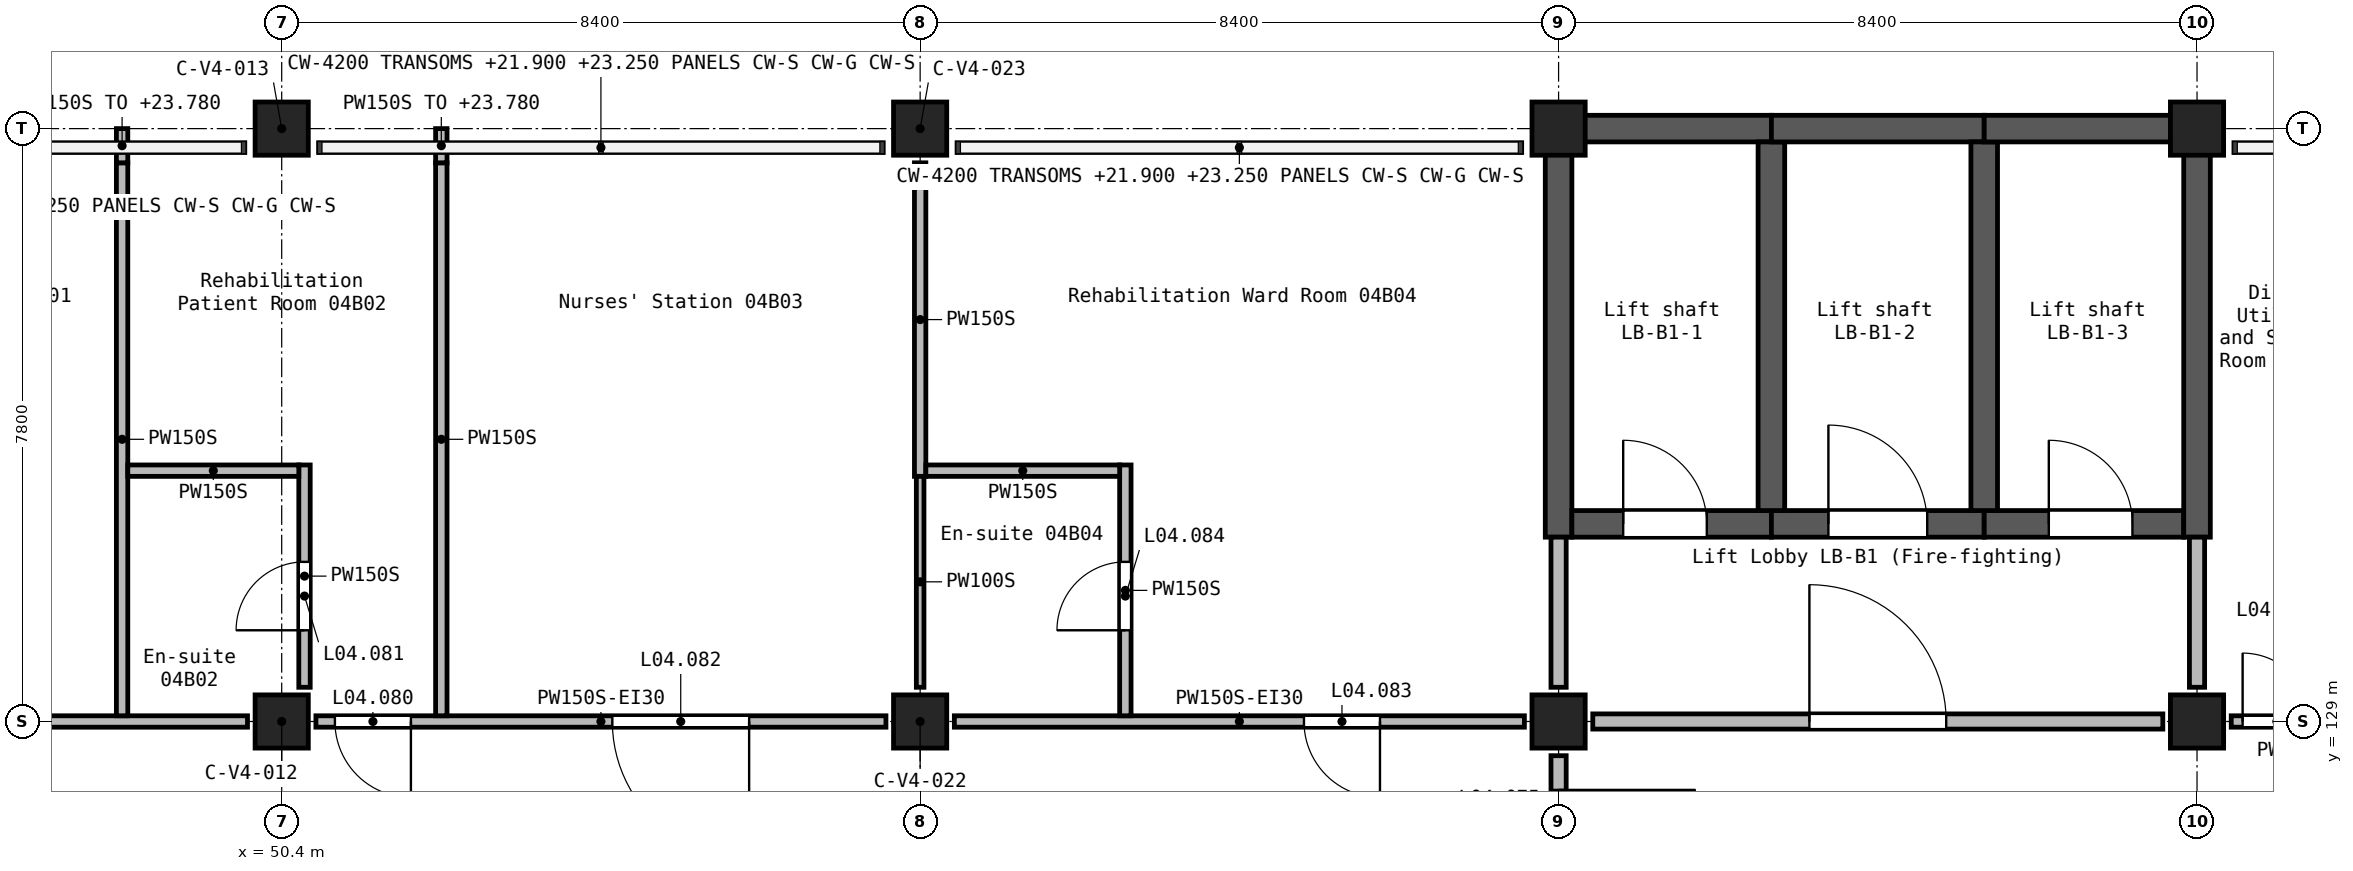
"""IFC4 building model, lengths in metres.
Left out: names, types, materials, properties, quantities, classifications, styles, units other than length and angle.
Written with IfcOpenShell. Run it as: python <this file> out.ifc"""

import sys

from ifc_helpers import new_model, si_unit, direction, frame, frame_2d, origin, origin_2d, place, context, subcontext, project, spatial, rectangle, extrude, element, fill, save


model = new_model("IFC4")
c1 = context("Model", 3, precision=1e-05, world=origin(), true_north=direction((0.0, 1.0)))
c2 = subcontext(c1, "Body", "Model", "MODEL_VIEW")
j1 = project(units=[si_unit("LENGTHUNIT", "METRE"), si_unit("PLANEANGLEUNIT", "RADIAN")], contexts=[c1])
p1 = place(None, origin())
s1 = spatial("IfcSite", under=j1, at=p1, CompositionType="ELEMENT")
p2 = place(p1, origin())
s2 = spatial("IfcBuilding", under=s1, at=p2, CompositionType="ELEMENT")
p3 = place(p2, frame((0.0, 0.0, 21.0)))
s3 = spatial("IfcBuildingStorey", under=s2, at=p3, CompositionType="ELEMENT", Elevation=21.0)
for number, where, z_axis, x_axis in (
    (1, (50.4, 129.0, 0.0), (0.0, 0.0, 1.0), (1.0, 0.0, 0.0)),
    (2, (50.4, 136.8, 0.0), (0.0, 0.0, 1.0), (1.0, 0.0, 0.0)),
    (3, (58.8, 129.0, 0.0), (0.0, 0.0, 1.0), (1.0, 0.0, 0.0)),
    (4, (58.8, 136.8, 0.0), (0.0, 0.0, 1.0), (1.0, 0.0, 0.0)),
    (5, (67.2, 129.0, 0.0), (0.0, 0.0, 1.0), (1.0, 0.0, 0.0)),
    (6, (67.2, 136.8, 0.0), (0.0, 0.0, 1.0), (1.0, 0.0, 0.0)),
    (7, (75.6, 129.0, 0.0), (0.0, 0.0, 1.0), (1.0, 0.0, 0.0)),
    (8, (75.6, 136.8, 0.0), (0.0, 0.0, 1.0), (1.0, 0.0, 0.0)),
):
    element("IfcColumn", number, at=place(p3, frame(where, z_axis=z_axis, x_axis=x_axis)), inside=s3, PredefinedType="COLUMN", context=c2, shape_type="SweptSolid", body=[
        extrude(rectangle(XDim=0.7, YDim=0.7, at=origin_2d()), origin(), (0.0, 0.0, 1.0), 3.9),
    ])
p4 = place(p3, frame((67.025, 136.8, 0.0), z_axis=(0.0, 0.0, 1.0), x_axis=(1.0, 0.0, 0.0)))
e9 = element("IfcWall", 9, at=p4, inside=s3, PredefinedType="SHEAR", context=c2, shape_type="SweptSolid", body=[
    extrude(rectangle(XDim=2.975, YDim=0.35, at=frame_2d((1.488, 0.0))), origin(), (0.0, 0.0, 1.0), 3.9),
])
p5 = place(p3, frame((67.2, 131.425, 0.0), z_axis=(0.0, 0.0, 1.0), x_axis=(0.0, 1.0, 0.0)))
e10 = element("IfcWall", 10, at=p5, inside=s3, PredefinedType="SHEAR", context=c2, shape_type="SweptSolid", body=[
    extrude(rectangle(XDim=5.2, YDim=0.35, at=frame_2d((2.6, 0.0))), origin(), (0.0, 0.0, 1.0), 3.9),
])
p6 = place(p3, frame((67.375, 131.6, 0.0), z_axis=(0.0, 0.0, 1.0), x_axis=(1.0, 0.0, 0.0)))
e11 = element("IfcWall", 11, at=p6, inside=s3, PredefinedType="SHEAR", context=c2, shape_type="SweptSolid", body=[
    extrude(rectangle(XDim=2.625, YDim=0.35, at=frame_2d((1.312, 0.0))), origin(), (0.0, 0.0, 1.0), 3.9),
])
p7 = place(p6, frame((0.675, 0.0, 0.0)))
e12 = element("IfcOpeningElement", 12, at=p7, cuts=e11, PredefinedType="OPENING", context=c2, shape_type="SweptSolid", body=[
    extrude(rectangle(XDim=1.1, YDim=2.1, at=frame_2d((0.55, 1.05))), frame((0.0, 0.185, 0.0), z_axis=(0.0, -1.0, 0.0), x_axis=(1.0, 0.0, 0.0)), (0.0, 0.0, 1.0), 0.37),
])
p8 = place(p3, frame((70.0, 131.6, 0.0), z_axis=(0.0, 0.0, 1.0), x_axis=(1.0, 0.0, 0.0)))
e13 = element("IfcWall", 13, at=p8, inside=s3, PredefinedType="SHEAR", context=c2, shape_type="SweptSolid", body=[
    extrude(rectangle(XDim=2.8, YDim=0.35, at=frame_2d((1.4, 0.0))), origin(), (0.0, 0.0, 1.0), 3.9),
])
p9 = place(p8, frame((0.75, 0.0, 0.0)))
e14 = element("IfcOpeningElement", 14, at=p9, cuts=e13, PredefinedType="OPENING", context=c2, shape_type="SweptSolid", body=[
    extrude(rectangle(XDim=1.3, YDim=2.1, at=frame_2d((0.65, 1.05))), frame((0.0, 0.185, 0.0), z_axis=(0.0, -1.0, 0.0), x_axis=(1.0, 0.0, 0.0)), (0.0, 0.0, 1.0), 0.37),
])
p10 = place(p3, frame((70.0, 131.775, 0.0), z_axis=(0.0, 0.0, 1.0), x_axis=(0.0, 1.0, 0.0)))
e15 = element("IfcWall", 15, at=p10, inside=s3, PredefinedType="SHEAR", context=c2, shape_type="SweptSolid", body=[
    extrude(rectangle(XDim=4.85, YDim=0.35, at=frame_2d((2.425, 0.0))), origin(), (0.0, 0.0, 1.0), 3.9),
])
p11 = place(p3, frame((70.0, 136.8, 0.0), z_axis=(0.0, 0.0, 1.0), x_axis=(1.0, 0.0, 0.0)))
e16 = element("IfcWall", 16, at=p11, inside=s3, PredefinedType="SHEAR", context=c2, shape_type="SweptSolid", body=[
    extrude(rectangle(XDim=2.8, YDim=0.35, at=frame_2d((1.4, 0.0))), origin(), (0.0, 0.0, 1.0), 3.9),
])
p12 = place(p3, frame((72.8, 131.6, 0.0), z_axis=(0.0, 0.0, 1.0), x_axis=(1.0, 0.0, 0.0)))
e17 = element("IfcWall", 17, at=p12, inside=s3, PredefinedType="SHEAR", context=c2, shape_type="SweptSolid", body=[
    extrude(rectangle(XDim=2.625, YDim=0.35, at=frame_2d((1.312, 0.0))), origin(), (0.0, 0.0, 1.0), 3.9),
])
p13 = place(p12, frame((0.85, 0.0, 0.0)))
e18 = element("IfcOpeningElement", 18, at=p13, cuts=e17, PredefinedType="OPENING", context=c2, shape_type="SweptSolid", body=[
    extrude(rectangle(XDim=1.1, YDim=2.1, at=frame_2d((0.55, 1.05))), frame((0.0, 0.185, 0.0), z_axis=(0.0, -1.0, 0.0), x_axis=(1.0, 0.0, 0.0)), (0.0, 0.0, 1.0), 0.37),
])
p14 = place(p3, frame((72.8, 131.775, 0.0), z_axis=(0.0, 0.0, 1.0), x_axis=(0.0, 1.0, 0.0)))
e19 = element("IfcWall", 19, at=p14, inside=s3, PredefinedType="SHEAR", context=c2, shape_type="SweptSolid", body=[
    extrude(rectangle(XDim=4.85, YDim=0.35, at=frame_2d((2.425, 0.0))), origin(), (0.0, 0.0, 1.0), 3.9),
])
p15 = place(p3, frame((72.8, 136.8, 0.0), z_axis=(0.0, 0.0, 1.0), x_axis=(1.0, 0.0, 0.0)))
e20 = element("IfcWall", 20, at=p15, inside=s3, PredefinedType="SHEAR", context=c2, shape_type="SweptSolid", body=[
    extrude(rectangle(XDim=2.625, YDim=0.35, at=frame_2d((1.312, 0.0))), origin(), (0.0, 0.0, 1.0), 3.9),
])
p16 = place(p3, frame((75.6, 131.425, 0.0), z_axis=(0.0, 0.0, 1.0), x_axis=(0.0, 1.0, 0.0)))
e21 = element("IfcWall", 21, at=p16, inside=s3, PredefinedType="SHEAR", context=c2, shape_type="SweptSolid", body=[
    extrude(rectangle(XDim=5.55, YDim=0.35, at=frame_2d((2.775, 0.0))), origin(), (0.0, 0.0, 1.0), 3.9),
])
p17 = place(p3, frame((67.2, 131.425, 0.0), z_axis=(0.0, 0.0, 1.0), x_axis=(0.0, -1.0, 0.0)))
e22 = element("IfcWall", 22, at=p17, inside=s3, PredefinedType="SOLIDWALL", context=c2, shape_type="SweptSolid", body=[
    extrude(rectangle(XDim=1.975, YDim=0.2, at=frame_2d((0.988, 0.0))), origin(), (0.0, 0.0, 1.0), 3.6),
])
p18 = place(p3, frame((67.2, 128.55, 0.0), z_axis=(0.0, 0.0, 1.0), x_axis=(0.0, -1.0, 0.0)))
e23 = element("IfcWall", 23, at=p18, inside=s3, PredefinedType="SOLIDWALL", context=c2, shape_type="SweptSolid", body=[
    extrude(rectangle(XDim=2.7, YDim=0.2, at=frame_2d((1.35, 0.0))), origin(), (0.0, 0.0, 1.0), 3.6),
])
p19 = place(p18, frame((0.45, 0.0, 0.0)))
e24 = element("IfcOpeningElement", 24, at=p19, cuts=e23, PredefinedType="OPENING", context=c2, shape_type="SweptSolid", body=[
    extrude(rectangle(XDim=1.8, YDim=2.1, at=frame_2d((0.9, 1.05))), frame((0.0, 0.11, 0.0), z_axis=(0.0, -1.0, 0.0), x_axis=(1.0, 0.0, 0.0)), (0.0, 0.0, 1.0), 0.22),
])
p20 = place(p3, frame((67.65, 129.0, 0.0), z_axis=(0.0, 0.0, 1.0), x_axis=(1.0, 0.0, 0.0)))
e25 = element("IfcWall", 25, at=p20, inside=s3, PredefinedType="SOLIDWALL", context=c2, shape_type="SweptSolid", body=[
    extrude(rectangle(XDim=7.5, YDim=0.2, at=frame_2d((3.75, 0.0))), origin(), (0.0, 0.0, 1.0), 3.6),
])
p21 = place(p20, frame((2.85, 0.0, 0.0)))
e26 = element("IfcOpeningElement", 26, at=p21, cuts=e25, PredefinedType="OPENING", context=c2, shape_type="SweptSolid", body=[
    extrude(rectangle(XDim=1.8, YDim=2.1, at=frame_2d((0.9, 1.05))), frame((0.0, 0.11, 0.0), z_axis=(0.0, -1.0, 0.0), x_axis=(1.0, 0.0, 0.0)), (0.0, 0.0, 1.0), 0.22),
])
p22 = place(p3, frame((75.6, 129.45, 0.0), z_axis=(0.0, 0.0, 1.0), x_axis=(0.0, 1.0, 0.0)))
e27 = element("IfcWall", 27, at=p22, inside=s3, PredefinedType="SOLIDWALL", context=c2, shape_type="SweptSolid", body=[
    extrude(rectangle(XDim=1.975, YDim=0.2, at=frame_2d((0.988, 0.0))), origin(), (0.0, 0.0, 1.0), 3.6),
])
p23 = place(p3, frame((66.75, 129.0, 0.0), z_axis=(0.0, 0.0, 1.0), x_axis=(-1.0, 0.0, 0.0)))
e28 = element("IfcWall", 28, at=p23, inside=s3, PredefinedType="PARTITIONING", context=c2, shape_type="SweptSolid", body=[
    extrude(rectangle(XDim=7.5, YDim=0.15, at=frame_2d((3.75, 0.0))), origin(), (0.0, 0.0, 1.0), 3.6),
])
p24 = place(p23, frame((1.9, 0.0, 0.0)))
e29 = element("IfcOpeningElement", 29, at=p24, cuts=e28, PredefinedType="OPENING", context=c2, shape_type="SweptSolid", body=[
    extrude(rectangle(XDim=1.0, YDim=2.1, at=frame_2d((0.5, 1.05))), frame((0.0, 0.085, 0.0), z_axis=(0.0, -1.0, 0.0), x_axis=(1.0, 0.0, 0.0)), (0.0, 0.0, 1.0), 0.17),
])
p25 = place(p3, frame((58.35, 129.0, 0.0), z_axis=(0.0, 0.0, 1.0), x_axis=(-1.0, 0.0, 0.0)))
e30 = element("IfcWall", 30, at=p25, inside=s3, PredefinedType="PARTITIONING", context=c2, shape_type="SweptSolid", body=[
    extrude(rectangle(XDim=7.5, YDim=0.15, at=frame_2d((3.75, 0.0))), origin(), (0.0, 0.0, 1.0), 3.6),
])
p26 = place(p25, frame((6.25, 0.0, 0.0)))
e31 = element("IfcOpeningElement", 31, at=p26, cuts=e30, PredefinedType="OPENING", context=c2, shape_type="SweptSolid", body=[
    extrude(rectangle(XDim=1.0, YDim=2.1, at=frame_2d((0.5, 1.05))), frame((0.0, 0.085, 0.0), z_axis=(0.0, -1.0, 0.0), x_axis=(1.0, 0.0, 0.0)), (0.0, 0.0, 1.0), 0.17),
])
p27 = place(p25, frame((1.8, 0.0, 0.0)))
e32 = element("IfcOpeningElement", 32, at=p27, cuts=e30, PredefinedType="OPENING", context=c2, shape_type="SweptSolid", body=[
    extrude(rectangle(XDim=1.8, YDim=2.1, at=frame_2d((0.9, 1.05))), frame((0.0, 0.085, 0.0), z_axis=(0.0, -1.0, 0.0), x_axis=(1.0, 0.0, 0.0)), (0.0, 0.0, 1.0), 0.17),
])
p28 = place(p3, frame((49.95, 129.0, 0.0), z_axis=(0.0, 0.0, 1.0), x_axis=(-1.0, 0.0, 0.0)))
e33 = element("IfcWall", 33, at=p28, inside=s3, PredefinedType="PARTITIONING", context=c2, shape_type="SweptSolid", body=[
    extrude(rectangle(XDim=7.5, YDim=0.15, at=frame_2d((3.75, 0.0))), origin(), (0.0, 0.0, 1.0), 3.6),
])
p29 = place(p28, frame((2.95, 0.0, 0.0)))
e34 = element("IfcOpeningElement", 34, at=p29, cuts=e33, PredefinedType="OPENING", context=c2, shape_type="SweptSolid", body=[
    extrude(rectangle(XDim=1.0, YDim=2.1, at=frame_2d((0.5, 1.05))), frame((0.0, 0.085, 0.0), z_axis=(0.0, -1.0, 0.0), x_axis=(1.0, 0.0, 0.0)), (0.0, 0.0, 1.0), 0.17),
])
p30 = place(p3, frame((76.05, 129.0, 0.0), z_axis=(0.0, 0.0, 1.0), x_axis=(1.0, 0.0, 0.0)))
e35 = element("IfcWall", 35, at=p30, inside=s3, PredefinedType="PARTITIONING", context=c2, shape_type="SweptSolid", body=[
    extrude(rectangle(XDim=1.575, YDim=0.15, at=frame_2d((0.788, 0.0))), origin(), (0.0, 0.0, 1.0), 3.6),
])
p31 = place(p30, frame((0.15, 0.0, 0.0)))
e36 = element("IfcOpeningElement", 36, at=p31, cuts=e35, PredefinedType="OPENING", context=c2, shape_type="SweptSolid", body=[
    extrude(rectangle(XDim=0.9, YDim=2.1, at=frame_2d((0.45, 1.05))), frame((0.0, 0.085, 0.0), z_axis=(0.0, -1.0, 0.0), x_axis=(1.0, 0.0, 0.0)), (0.0, 0.0, 1.0), 0.17),
])
p32 = place(p3, frame((48.3, 129.075, 0.0), z_axis=(0.0, 0.0, 1.0), x_axis=(0.0, 1.0, 0.0)))
e37 = element("IfcWall", 37, at=p32, inside=s3, PredefinedType="PARTITIONING", context=c2, shape_type="SweptSolid", body=[
    extrude(rectangle(XDim=7.275, YDim=0.15, at=frame_2d((3.638, 0.0))), origin(), (0.0, 0.0, 1.0), 3.6),
])
p33 = place(p3, frame((48.3, 136.35, 0.0), z_axis=(0.0, 0.0, 1.0), x_axis=(0.0, 1.0, 0.0)))
e38 = element("IfcWall", 38, at=p33, inside=s3, PredefinedType="PARTITIONING", context=c2, shape_type="SweptSolid", body=[
    extrude(rectangle(XDim=0.45, YDim=0.15, at=frame_2d((0.225, 0.0))), origin(), (0.0, 0.0, 1.0), 2.78),
])
p34 = place(p3, frame((52.5, 129.075, 0.0), z_axis=(0.0, 0.0, 1.0), x_axis=(0.0, 1.0, 0.0)))
e39 = element("IfcWall", 39, at=p34, inside=s3, PredefinedType="PARTITIONING", context=c2, shape_type="SweptSolid", body=[
    extrude(rectangle(XDim=7.275, YDim=0.15, at=frame_2d((3.638, 0.0))), origin(), (0.0, 0.0, 1.0), 3.6),
])
p35 = place(p3, frame((52.5, 136.35, 0.0), z_axis=(0.0, 0.0, 1.0), x_axis=(0.0, 1.0, 0.0)))
e40 = element("IfcWall", 40, at=p35, inside=s3, PredefinedType="PARTITIONING", context=c2, shape_type="SweptSolid", body=[
    extrude(rectangle(XDim=0.45, YDim=0.15, at=frame_2d((0.225, 0.0))), origin(), (0.0, 0.0, 1.0), 2.78),
])
p36 = place(p3, frame((58.8, 132.225, 0.0), z_axis=(0.0, 0.0, 1.0), x_axis=(0.0, 1.0, 0.0)))
e41 = element("IfcWall", 41, at=p36, inside=s3, PredefinedType="PARTITIONING", context=c2, shape_type="SweptSolid", body=[
    extrude(rectangle(XDim=4.125, YDim=0.15, at=frame_2d((2.062, 0.0))), origin(), (0.0, 0.0, 1.0), 3.6),
])
p37 = place(p3, frame((50.7, 129.45, 0.0), z_axis=(0.0, 0.0, 1.0), x_axis=(0.0, 1.0, 0.0)))
e42 = element("IfcWall", 42, at=p37, inside=s3, PredefinedType="PARTITIONING", context=c2, shape_type="SweptSolid", body=[
    extrude(rectangle(XDim=2.925, YDim=0.15, at=frame_2d((1.462, 0.0))), origin(), (0.0, 0.0, 1.0), 3.6),
])
p38 = place(p37, frame((0.75, 0.0, 0.0)))
e43 = element("IfcOpeningElement", 43, at=p38, cuts=e42, PredefinedType="OPENING", context=c2, shape_type="SweptSolid", body=[
    extrude(rectangle(XDim=0.9, YDim=2.1, at=frame_2d((0.45, 1.05))), frame((0.0, 0.085, 0.0), z_axis=(0.0, -1.0, 0.0), x_axis=(1.0, 0.0, 0.0)), (0.0, 0.0, 1.0), 0.17),
])
p39 = place(p3, frame((61.5, 129.075, 0.0), z_axis=(0.0, 0.0, 1.0), x_axis=(0.0, 1.0, 0.0)))
e44 = element("IfcWall", 44, at=p39, inside=s3, PredefinedType="PARTITIONING", context=c2, shape_type="SweptSolid", body=[
    extrude(rectangle(XDim=3.3, YDim=0.15, at=frame_2d((1.65, 0.0))), origin(), (0.0, 0.0, 1.0), 3.6),
])
p40 = place(p39, frame((1.125, 0.0, 0.0)))
e45 = element("IfcOpeningElement", 45, at=p40, cuts=e44, PredefinedType="OPENING", context=c2, shape_type="SweptSolid", body=[
    extrude(rectangle(XDim=0.9, YDim=2.1, at=frame_2d((0.45, 1.05))), frame((0.0, 0.085, 0.0), z_axis=(0.0, -1.0, 0.0), x_axis=(1.0, 0.0, 0.0)), (0.0, 0.0, 1.0), 0.17),
])
p41 = place(p3, frame((58.875, 132.3, 0.0), z_axis=(0.0, 0.0, 1.0), x_axis=(1.0, 0.0, 0.0)))
e46 = element("IfcWall", 46, at=p41, inside=s3, PredefinedType="PARTITIONING", context=c2, shape_type="SweptSolid", body=[
    extrude(rectangle(XDim=2.55, YDim=0.15, at=frame_2d((1.275, 0.0))), origin(), (0.0, 0.0, 1.0), 3.6),
])
p42 = place(p3, frame((48.375, 132.3, 0.0), z_axis=(0.0, 0.0, 1.0), x_axis=(1.0, 0.0, 0.0)))
e47 = element("IfcWall", 47, at=p42, inside=s3, PredefinedType="PARTITIONING", context=c2, shape_type="SweptSolid", body=[
    extrude(rectangle(XDim=2.25, YDim=0.15, at=frame_2d((1.125, 0.0))), origin(), (0.0, 0.0, 1.0), 3.6),
])
p43 = place(p3, frame((58.8, 129.45, 0.0), z_axis=(0.0, 0.0, 1.0), x_axis=(0.0, 1.0, 0.0)))
e48 = element("IfcWall", 48, at=p43, inside=s3, PredefinedType="PARTITIONING", context=c2, shape_type="SweptSolid", body=[
    extrude(rectangle(XDim=2.775, YDim=0.1, at=frame_2d((1.388, 0.0))), origin(), (0.0, 0.0, 1.0), 3.6),
])
p44 = place(p19, origin())
e49 = element("IfcDoor", 49, at=p44, inside=s3, OperationType="DOUBLE_DOOR_SINGLE_SWING", PredefinedType="DOOR", context=c2, shape_type="SweptSolid", body=[
    extrude(rectangle(XDim=1.8, YDim=2.1, at=frame_2d((0.9, 1.05))), frame((0.0, 0.025, 0.0), z_axis=(0.0, -1.0, 0.0), x_axis=(1.0, 0.0, 0.0)), (0.0, 0.0, 1.0), 0.05),
])
fill(e24, e49)
p45 = place(p26, frame((1.0, 0.0, 0.0), z_axis=(0.0, 0.0, 1.0), x_axis=(-1.0, 0.0, 0.0)))
e50 = element("IfcDoor", 50, at=p45, inside=s3, OperationType="SINGLE_SWING_LEFT", PredefinedType="DOOR", context=c2, shape_type="SweptSolid", body=[
    extrude(rectangle(XDim=1.0, YDim=2.1, at=frame_2d((0.5, 1.05))), frame((0.0, 0.025, 0.0), z_axis=(0.0, -1.0, 0.0), x_axis=(1.0, 0.0, 0.0)), (0.0, 0.0, 1.0), 0.05),
])
fill(e31, e50)
p46 = place(p38, origin())
e51 = element("IfcDoor", 51, at=p46, inside=s3, OperationType="SINGLE_SWING_LEFT", PredefinedType="DOOR", context=c2, shape_type="SweptSolid", body=[
    extrude(rectangle(XDim=0.9, YDim=2.1, at=frame_2d((0.45, 1.05))), frame((0.0, 0.025, 0.0), z_axis=(0.0, -1.0, 0.0), x_axis=(1.0, 0.0, 0.0)), (0.0, 0.0, 1.0), 0.05),
])
fill(e43, e51)
p47 = place(p27, frame((1.8, 0.0, 0.0), z_axis=(0.0, 0.0, 1.0), x_axis=(-1.0, 0.0, 0.0)))
e52 = element("IfcDoor", 52, at=p47, inside=s3, OperationType="DOUBLE_DOOR_SINGLE_SWING", PredefinedType="DOOR", context=c2, shape_type="SweptSolid", body=[
    extrude(rectangle(XDim=1.8, YDim=2.1, at=frame_2d((0.9, 1.05))), frame((0.0, 0.025, 0.0), z_axis=(0.0, -1.0, 0.0), x_axis=(1.0, 0.0, 0.0)), (0.0, 0.0, 1.0), 0.05),
])
fill(e32, e52)
p48 = place(p24, frame((1.0, 0.0, 0.0), z_axis=(0.0, 0.0, 1.0), x_axis=(-1.0, 0.0, 0.0)))
e53 = element("IfcDoor", 53, at=p48, inside=s3, OperationType="SINGLE_SWING_RIGHT", PredefinedType="DOOR", context=c2, shape_type="SweptSolid", body=[
    extrude(rectangle(XDim=1.0, YDim=2.1, at=frame_2d((0.5, 1.05))), frame((0.0, 0.025, 0.0), z_axis=(0.0, -1.0, 0.0), x_axis=(1.0, 0.0, 0.0)), (0.0, 0.0, 1.0), 0.05),
])
fill(e29, e53)
p49 = place(p40, origin())
e54 = element("IfcDoor", 54, at=p49, inside=s3, OperationType="SINGLE_SWING_LEFT", PredefinedType="DOOR", context=c2, shape_type="SweptSolid", body=[
    extrude(rectangle(XDim=0.9, YDim=2.1, at=frame_2d((0.45, 1.05))), frame((0.0, 0.025, 0.0), z_axis=(0.0, -1.0, 0.0), x_axis=(1.0, 0.0, 0.0)), (0.0, 0.0, 1.0), 0.05),
])
fill(e45, e54)
p50 = place(p31, origin())
e55 = element("IfcDoor", 55, at=p50, inside=s3, OperationType="SINGLE_SWING_LEFT", PredefinedType="DOOR", context=c2, shape_type="SweptSolid", body=[
    extrude(rectangle(XDim=0.9, YDim=2.1, at=frame_2d((0.45, 1.05))), frame((0.0, 0.025, 0.0), z_axis=(0.0, -1.0, 0.0), x_axis=(1.0, 0.0, 0.0)), (0.0, 0.0, 1.0), 0.05),
])
fill(e36, e55)
p51 = place(p21, origin())
e56 = element("IfcDoor", 56, at=p51, inside=s3, OperationType="DOUBLE_DOOR_SINGLE_SWING", PredefinedType="DOOR", context=c2, shape_type="SweptSolid", body=[
    extrude(rectangle(XDim=1.8, YDim=2.1, at=frame_2d((0.9, 1.05))), frame((0.0, 0.025, 0.0), z_axis=(0.0, -1.0, 0.0), x_axis=(1.0, 0.0, 0.0)), (0.0, 0.0, 1.0), 0.05),
])
fill(e26, e56)
p52 = place(p7, origin())
e57 = element("IfcDoor", 57, at=p52, inside=s3, OperationType="DOUBLE_DOOR_SLIDING", PredefinedType="DOOR", context=c2, shape_type="SweptSolid", body=[
    extrude(rectangle(XDim=1.1, YDim=2.1, at=frame_2d((0.55, 1.05))), frame((0.0, 0.025, 0.0), z_axis=(0.0, -1.0, 0.0), x_axis=(1.0, 0.0, 0.0)), (0.0, 0.0, 1.0), 0.05),
])
fill(e12, e57)
p53 = place(p9, origin())
e58 = element("IfcDoor", 58, at=p53, inside=s3, OperationType="DOUBLE_DOOR_SLIDING", PredefinedType="DOOR", context=c2, shape_type="SweptSolid", body=[
    extrude(rectangle(XDim=1.3, YDim=2.1, at=frame_2d((0.65, 1.05))), frame((0.0, 0.025, 0.0), z_axis=(0.0, -1.0, 0.0), x_axis=(1.0, 0.0, 0.0)), (0.0, 0.0, 1.0), 0.05),
])
fill(e14, e58)
p54 = place(p13, origin())
e59 = element("IfcDoor", 59, at=p54, inside=s3, OperationType="DOUBLE_DOOR_SLIDING", PredefinedType="DOOR", context=c2, shape_type="SweptSolid", body=[
    extrude(rectangle(XDim=1.1, YDim=2.1, at=frame_2d((0.55, 1.05))), frame((0.0, 0.025, 0.0), z_axis=(0.0, -1.0, 0.0), x_axis=(1.0, 0.0, 0.0)), (0.0, 0.0, 1.0), 0.05),
])
fill(e18, e59)
save(model, sys.argv[1])
